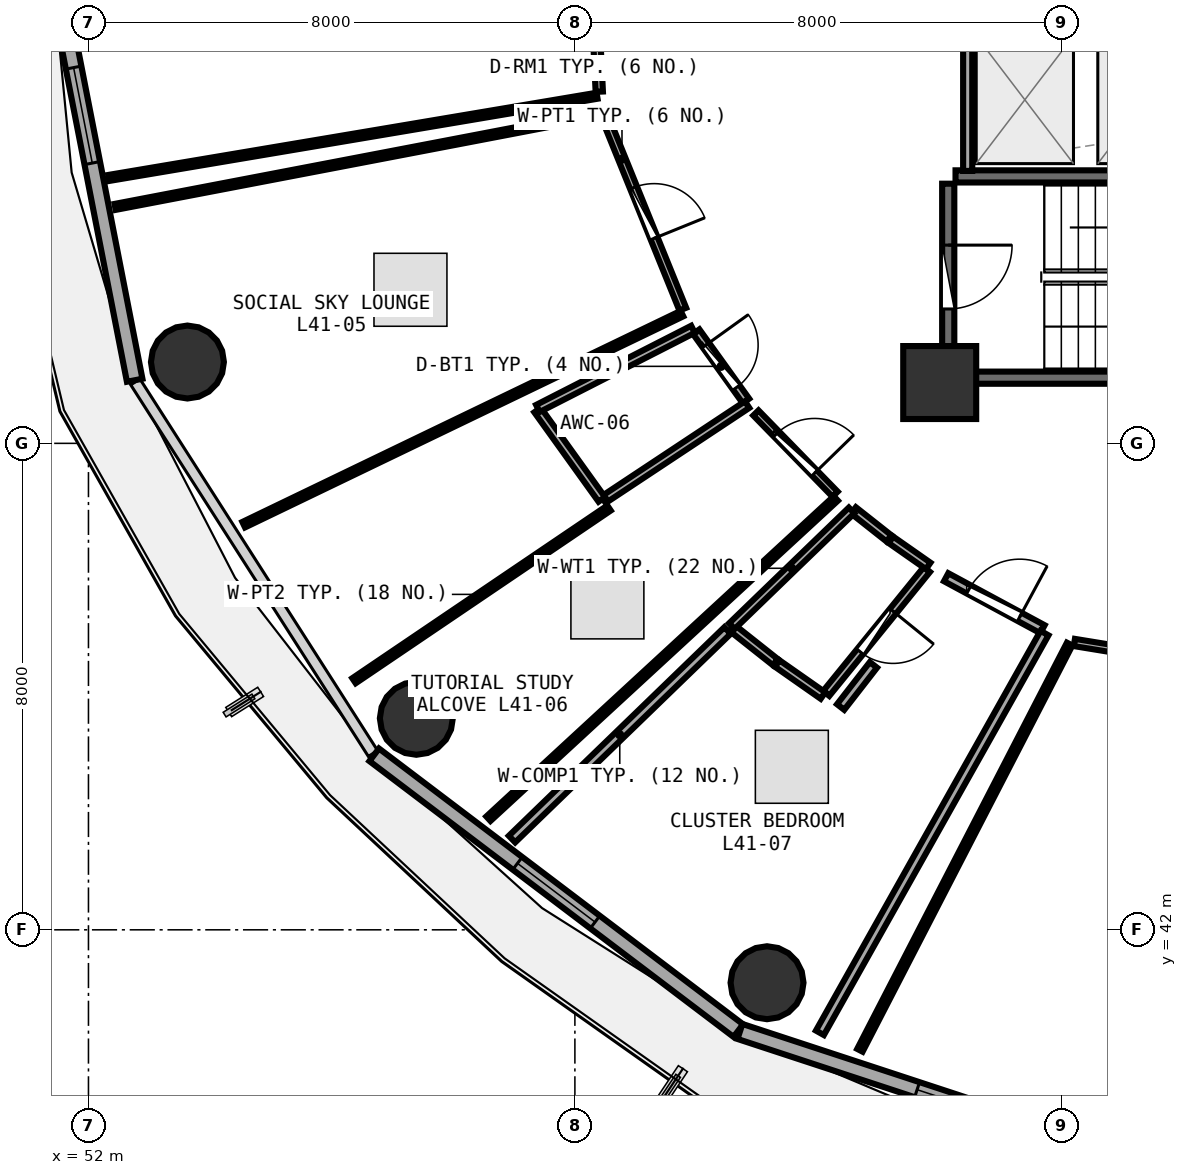
"""IFC4 building model, lengths in metres.
Left out: names, types, materials, properties, quantities, classifications, styles, units other than length and angle.
Written with IfcOpenShell. Run it as: python <this file> out.ifc"""

import sys

from ifc_helpers import new_model, si_unit, direction, frame, frame_2d, origin, origin_2d, place, context, subcontext, project, spatial, rectangle, circle, extrude, element, fill, save


model = new_model("IFC4")
c1 = context("Model", 3, precision=1e-05, world=origin(), true_north=direction((0.0, 1.0)))
c2 = subcontext(c1, "Body", "Model", "MODEL_VIEW")
j1 = project(units=[si_unit("LENGTHUNIT", "METRE"), si_unit("PLANEANGLEUNIT", "RADIAN")], contexts=[c1])
p1 = place(None, origin())
s1 = spatial("IfcSite", under=j1, at=p1, CompositionType="ELEMENT")
p2 = place(p1, origin())
s2 = spatial("IfcBuilding", under=s1, at=p2, CompositionType="ELEMENT")
p3 = place(p2, frame((0.0, 0.0, 161.85)))
s3 = spatial("IfcBuildingStorey", under=s2, at=p3, CompositionType="ELEMENT", Elevation=161.85)
p4 = place(p3, frame((66.0, 51.0, 0.0), z_axis=(0.0, 0.0, 1.0), x_axis=(1.0, 0.0, 0.0)))
e1 = element("IfcColumn", 1, at=p4, inside=s3, PredefinedType="PILASTER", context=c2, shape_type="SweptSolid", body=[
    extrude(rectangle(XDim=1.2, YDim=1.2, at=origin_2d()), origin(), (0.0, 0.0, 1.0), 3.75),
])
for number, where, z_axis, x_axis in (
    (2, (53.627, 51.337, 0.0), (0.0, 0.0, 1.0), (1.0, 0.0, 0.0)),
    (3, (57.392, 45.479, 0.0), (0.0, 0.0, 1.0), (1.0, 0.0, 0.0)),
    (4, (63.16, 41.13, 0.0), (0.0, 0.0, 1.0), (1.0, 0.0, 0.0)),
):
    element("IfcColumn", number, at=place(p3, frame(where, z_axis=z_axis, x_axis=x_axis)), inside=s3, PredefinedType="COLUMN", context=c2, shape_type="SweptSolid", body=[
        extrude(circle(Radius=0.6, at=origin_2d()), origin(), (0.0, 0.0, 1.0), 3.75),
    ])
p5 = place(p3, frame((51.403, 57.985, 0.0), z_axis=(0.0, 0.0, 1.0), x_axis=(0.191716984769, -0.981450252306, 0.0)))
e5 = element("IfcWall", 5, at=p5, inside=s3, PredefinedType="SOLIDWALL", context=c2, shape_type="SweptSolid", body=[
    extrude(rectangle(XDim=7.079, YDim=0.26, at=frame_2d((3.54, 0.0))), origin(), (0.0, 0.0, 1.0), 3.475),
])
p6 = place(p5, frame((1.84, 0.0, 0.85)))
e6 = element("IfcOpeningElement", 6, at=p6, cuts=e5, PredefinedType="OPENING", context=c2, shape_type="SweptSolid", body=[
    extrude(rectangle(XDim=1.6, YDim=1.45, at=frame_2d((0.8, 0.725))), frame((0.0, 0.14, 0.0), z_axis=(0.0, -1.0, 0.0), x_axis=(1.0, 0.0, 0.0)), (0.0, 0.0, 1.0), 0.28),
])
p7 = place(p3, frame((56.699, 44.878, 0.0), z_axis=(0.0, 0.0, 1.0), x_axis=(0.797163719609, -0.603763202042, 0.0)))
e7 = element("IfcWall", 7, at=p7, inside=s3, PredefinedType="SOLIDWALL", context=c2, shape_type="SweptSolid", body=[
    extrude(rectangle(XDim=7.512, YDim=0.26, at=frame_2d((3.756, 0.0))), origin(), (0.0, 0.0, 1.0), 3.475),
])
p8 = place(p7, frame((2.956, 0.0, 0.85)))
e8 = element("IfcOpeningElement", 8, at=p8, cuts=e7, PredefinedType="OPENING", context=c2, shape_type="SweptSolid", body=[
    extrude(rectangle(XDim=1.6, YDim=1.45, at=frame_2d((0.8, 0.725))), frame((0.0, 0.14, 0.0), z_axis=(0.0, -1.0, 0.0), x_axis=(1.0, 0.0, 0.0)), (0.0, 0.0, 1.0), 0.28),
])
p9 = place(p3, frame((62.714, 40.328, 0.0), z_axis=(0.0, 0.0, 1.0), x_axis=(0.950038302428, -0.312133343173, 0.0)))
e9 = element("IfcWall", 9, at=p9, inside=s3, PredefinedType="SOLIDWALL", context=c2, shape_type="SweptSolid", body=[
    extrude(rectangle(XDim=7.733, YDim=0.26, at=frame_2d((3.867, 0.0))), origin(), (0.0, 0.0, 1.0), 3.475),
])
p10 = place(p9, frame((3.067, 0.0, 0.85)))
e10 = element("IfcOpeningElement", 10, at=p10, cuts=e9, PredefinedType="OPENING", context=c2, shape_type="SweptSolid", body=[
    extrude(rectangle(XDim=1.6, YDim=1.45, at=frame_2d((0.8, 0.725))), frame((0.0, 0.14, 0.0), z_axis=(0.0, -1.0, 0.0), x_axis=(1.0, 0.0, 0.0)), (0.0, 0.0, 1.0), 0.28),
])
for number, where, z_axis, x_axis in (
    (11, (66.26, 51.08, 0.0), (0.0, 0.0, 1.0), (1.0, 0.0, 0.0)),
    (12, (73.42, 54.39, 0.0), (0.0, 0.0, 1.0), (-1.0, 0.0, 0.0)),
):
    element("IfcWall", number, at=place(p3, frame(where, z_axis=z_axis, x_axis=x_axis)), inside=s3, PredefinedType="SHEAR", context=c2, shape_type="SweptSolid", body=[
        extrude(rectangle(XDim=7.16, YDim=0.2, at=frame_2d((3.58, 0.0))), origin(), (0.0, 0.0, 1.0), 3.49),
    ])
p11 = place(p3, frame((66.14, 54.27, 0.0), z_axis=(0.0, 0.0, 1.0), x_axis=(0.0, -1.0, 0.0)))
e13 = element("IfcWall", 13, at=p11, inside=s3, PredefinedType="SHEAR", context=c2, shape_type="SweptSolid", body=[
    extrude(rectangle(XDim=3.07, YDim=0.2, at=frame_2d((1.535, 0.0))), origin(), (0.0, 0.0, 1.0), 3.49),
])
p12 = place(p11, frame((1.01, 0.0, 0.0)))
e14 = element("IfcOpeningElement", 14, at=p12, cuts=e13, PredefinedType="OPENING", context=c2, shape_type="SweptSolid", body=[
    extrude(rectangle(XDim=1.05, YDim=2.1, at=frame_2d((0.525, 1.05))), frame((0.0, 0.11, 0.0), z_axis=(0.0, -1.0, 0.0), x_axis=(1.0, 0.0, 0.0)), (0.0, 0.0, 1.0), 0.22),
])
p13 = place(p3, frame((66.46, 54.48, 0.0), z_axis=(0.0, 0.0, 1.0), x_axis=(0.0, 1.0, 0.0)))
e15 = element("IfcWall", 15, at=p13, inside=s3, PredefinedType="PARTITIONING", context=c2, shape_type="SweptSolid", body=[
    extrude(rectangle(XDim=2.29, YDim=0.15, at=frame_2d((1.145, 0.0))), origin(), (0.0, 0.0, 1.0), 3.48),
])
p14 = place(p3, frame((68.214, 46.725, 0.0), z_axis=(0.0, 0.0, 1.0), x_axis=(0.986922164317, -0.161197523493, 0.0)))
e16 = element("IfcWall", 16, at=p14, inside=s3, PredefinedType="PARTITIONING", context=c2, shape_type="SweptSolid", body=[
    extrude(rectangle(XDim=6.877, YDim=0.12, at=frame_2d((3.439, 0.0))), origin(), (0.0, 0.0, 1.0), 2.975),
])
p15 = place(p14, frame((2.989, 0.0, 0.0)))
e17 = element("IfcOpeningElement", 17, at=p15, cuts=e16, PredefinedType="OPENING", context=c2, shape_type="SweptSolid", body=[
    extrude(rectangle(XDim=0.9, YDim=2.08, at=frame_2d((0.45, 1.04))), frame((0.0, 0.07, 0.0), z_axis=(0.0, -1.0, 0.0), x_axis=(1.0, 0.0, 0.0)), (0.0, 0.0, 1.0), 0.14),
])
p16 = place(p3, frame((60.238, 59.144, 0.0), z_axis=(0.0, 0.0, 1.0), x_axis=(0.048537190422, -0.998821375996, 0.0)))
e18 = element("IfcWall", 18, at=p16, inside=s3, PredefinedType="PARTITIONING", context=c2, shape_type="SweptSolid", body=[
    extrude(rectangle(XDim=3.365, YDim=0.12, at=frame_2d((1.683, 0.0))), origin(), (0.0, 0.0, 1.0), 2.975),
])
p17 = place(p16, frame((1.233, 0.0, 0.0)))
e19 = element("IfcOpeningElement", 19, at=p17, cuts=e18, PredefinedType="OPENING", context=c2, shape_type="SweptSolid", body=[
    extrude(rectangle(XDim=0.9, YDim=2.08, at=frame_2d((0.45, 1.04))), frame((0.0, 0.07, 0.0), z_axis=(0.0, -1.0, 0.0), x_axis=(1.0, 0.0, 0.0)), (0.0, 0.0, 1.0), 0.14),
])
p18 = place(p3, frame((60.492, 55.369, 0.0), z_axis=(0.0, 0.0, 1.0), x_axis=(0.3756420079, -0.926764847143, 0.0)))
e20 = element("IfcWall", 20, at=p18, inside=s3, PredefinedType="PARTITIONING", context=c2, shape_type="SweptSolid", body=[
    extrude(rectangle(XDim=3.413, YDim=0.12, at=frame_2d((1.707, 0.0))), origin(), (0.0, 0.0, 1.0), 3.235),
])
p19 = place(p18, frame((1.256, 0.0, 0.0)))
e21 = element("IfcOpeningElement", 21, at=p19, cuts=e20, PredefinedType="OPENING", context=c2, shape_type="SweptSolid", body=[
    extrude(rectangle(XDim=0.9, YDim=2.08, at=frame_2d((0.45, 1.04))), frame((0.0, 0.07, 0.0), z_axis=(0.0, -1.0, 0.0), x_axis=(1.0, 0.0, 0.0)), (0.0, 0.0, 1.0), 0.14),
])
p20 = place(p3, frame((61.995, 51.836, 0.0), z_axis=(0.0, 0.0, 1.0), x_axis=(0.583589438572, -0.81204886995, 0.0)))
e22 = element("IfcWall", 22, at=p20, inside=s3, PredefinedType="PLUMBINGWALL", context=c2, shape_type="SweptSolid", body=[
    extrude(rectangle(XDim=1.403, YDim=0.13, at=frame_2d((0.702, 0.0))), origin(), (0.0, 0.0, 1.0), 2.975),
])
p21 = place(p20, frame((0.272, 0.0, 0.0)))
e23 = element("IfcOpeningElement", 23, at=p21, cuts=e22, PredefinedType="OPENING", context=c2, shape_type="SweptSolid", body=[
    extrude(rectangle(XDim=0.86, YDim=2.05, at=frame_2d((0.43, 1.025))), frame((0.0, 0.075, 0.0), z_axis=(0.0, -1.0, 0.0), x_axis=(1.0, 0.0, 0.0)), (0.0, 0.0, 1.0), 0.15),
])
p22 = place(p3, frame((62.977, 50.5, 0.0), z_axis=(0.0, 0.0, 1.0), x_axis=(0.69801962686, -0.71607862733, 0.0)))
e24 = element("IfcWall", 24, at=p22, inside=s3, PredefinedType="PARTITIONING", context=c2, shape_type="SweptSolid", body=[
    extrude(rectangle(XDim=1.866, YDim=0.12, at=frame_2d((0.933, 0.0))), origin(), (0.0, 0.0, 1.0), 2.975),
])
p23 = place(p22, frame((0.483, 0.0, 0.0)))
e25 = element("IfcOpeningElement", 25, at=p23, cuts=e24, PredefinedType="OPENING", context=c2, shape_type="SweptSolid", body=[
    extrude(rectangle(XDim=0.9, YDim=2.08, at=frame_2d((0.45, 1.04))), frame((0.0, 0.07, 0.0), z_axis=(0.0, -1.0, 0.0), x_axis=(1.0, 0.0, 0.0)), (0.0, 0.0, 1.0), 0.14),
])
p24 = place(p3, frame((65.789, 47.927, 0.0), z_axis=(0.0, 0.0, 1.0), x_axis=(-0.630358119741, -0.776304476914, 0.0)))
e26 = element("IfcWall", 26, at=p24, inside=s3, PredefinedType="PLUMBINGWALL", context=c2, shape_type="SweptSolid", body=[
    extrude(rectangle(XDim=2.626, YDim=0.13, at=frame_2d((1.313, 0.0))), origin(), (0.0, 0.0, 1.0), 2.975),
])
p25 = place(p24, frame((0.883, 0.0, 0.0)))
e27 = element("IfcOpeningElement", 27, at=p25, cuts=e26, PredefinedType="OPENING", context=c2, shape_type="SweptSolid", body=[
    extrude(rectangle(XDim=0.86, YDim=2.05, at=frame_2d((0.43, 1.025))), frame((0.0, 0.075, 0.0), z_axis=(0.0, -1.0, 0.0), x_axis=(1.0, 0.0, 0.0)), (0.0, 0.0, 1.0), 0.15),
])
p26 = place(p3, frame((66.106, 47.799, 0.0), z_axis=(0.0, 0.0, 1.0), x_axis=(0.880052757217, -0.474875925389, 0.0)))
e28 = element("IfcWall", 28, at=p26, inside=s3, PredefinedType="PARTITIONING", context=c2, shape_type="SweptSolid", body=[
    extrude(rectangle(XDim=1.801, YDim=0.15, at=frame_2d((0.9, 0.0))), origin(), (0.0, 0.0, 1.0), 3.235),
])
p27 = place(p26, frame((0.425, 0.0, 0.0)))
e29 = element("IfcOpeningElement", 29, at=p27, cuts=e28, PredefinedType="OPENING", context=c2, shape_type="SweptSolid", body=[
    extrude(rectangle(XDim=0.95, YDim=2.08, at=frame_2d((0.475, 1.04))), frame((0.0, 0.085, 0.0), z_axis=(0.0, -1.0, 0.0), x_axis=(1.0, 0.0, 0.0)), (0.0, 0.0, 1.0), 0.17),
])
p28 = place(p3, frame((64.688, 40.019, 0.0), z_axis=(0.0, 0.0, 1.0), x_axis=(0.458748787104, 0.888566007864, 0.0)))
e30 = element("IfcWall", 30, at=p28, inside=s3, PredefinedType="PARTITIONING", context=c2, shape_type="SweptSolid", body=[
    extrude(rectangle(XDim=7.519, YDim=0.1, at=frame_2d((3.759, 0.0))), origin(), (0.0, 0.0, 1.0), 3.025),
])
p29 = place(p3, frame((60.365, 55.716, 0.0), z_axis=(0.0, 0.0, 1.0), x_axis=(-0.986127701838, -0.165988420279, 0.0)))
e31 = element("IfcWall", 31, at=p29, inside=s3, PredefinedType="PARTITIONING", context=c2, shape_type="SweptSolid", body=[
    extrude(rectangle(XDim=8.144, YDim=0.1, at=frame_2d((4.072, 0.0))), origin(), (0.0, 0.0, 1.0), 3.025),
])
p30 = place(p3, frame((61.761, 52.134, 0.0), z_axis=(0.0, 0.0, 1.0), x_axis=(-0.900968975812, -0.433883515042, 0.0)))
e32 = element("IfcWall", 32, at=p30, inside=s3, PredefinedType="PARTITIONING", context=c2, shape_type="SweptSolid", body=[
    extrude(rectangle(XDim=8.0, YDim=0.1, at=frame_2d((4.0, 0.0))), origin(), (0.0, 0.0, 1.0), 2.975),
])
p31 = place(p3, frame((52.438, 53.888, 0.0), z_axis=(0.0, 0.0, 1.0), x_axis=(0.982187250003, 0.187904778897, 0.0)))
e33 = element("IfcWall", 33, at=p31, inside=s3, PredefinedType="PARTITIONING", context=c2, shape_type="SweptSolid", body=[
    extrude(rectangle(XDim=8.137, YDim=0.1, at=frame_2d((4.069, 0.0))), origin(), (0.0, 0.0, 1.0), 3.025),
])
p32 = place(p3, frame((62.832, 50.637, 0.0), z_axis=(0.0, 0.0, 1.0), x_axis=(-0.833743735775, -0.55215159427, 0.0)))
e34 = element("IfcWall", 34, at=p32, inside=s3, PredefinedType="PLUMBINGWALL", context=c2, shape_type="SweptSolid", body=[
    extrude(rectangle(XDim=2.833, YDim=0.13, at=frame_2d((1.416, 0.0))), origin(), (0.0, 0.0, 1.0), 3.235),
])
p33 = place(p3, frame((60.442, 49.078, 0.0), z_axis=(0.0, 0.0, 1.0), x_axis=(-0.583480474688, 0.812127167172, 0.0)))
e35 = element("IfcWall", 35, at=p33, inside=s3, PredefinedType="PLUMBINGWALL", context=c2, shape_type="SweptSolid", body=[
    extrude(rectangle(XDim=1.811, YDim=0.13, at=frame_2d((0.906, 0.0))), origin(), (0.0, 0.0, 1.0), 3.48),
])
p34 = place(p3, frame((59.392, 50.574, 0.0), z_axis=(0.0, 0.0, 1.0), x_axis=(0.890678731245, 0.45463325627, 0.0)))
e36 = element("IfcWall", 36, at=p34, inside=s3, PredefinedType="PLUMBINGWALL", context=c2, shape_type="SweptSolid", body=[
    extrude(rectangle(XDim=2.863, YDim=0.13, at=frame_2d((1.432, 0.0))), origin(), (0.0, 0.0, 1.0), 2.975),
])
p35 = place(p3, frame((64.292, 49.094, 0.0), z_axis=(0.0, 0.0, 1.0), x_axis=(-0.73529828134, -0.677743636973, 0.0)))
e37 = element("IfcWall", 37, at=p35, inside=s3, PredefinedType="PARTITIONING", context=c2, shape_type="SweptSolid", body=[
    extrude(rectangle(XDim=7.771, YDim=0.1, at=frame_2d((3.886, 0.0))), origin(), (0.0, 0.0, 1.0), 3.025),
])
p36 = place(p3, frame((56.367, 46.096, 0.0), z_axis=(0.0, 0.0, 1.0), x_axis=(0.828061619218, 0.560637097219, 0.0)))
e38 = element("IfcWall", 38, at=p36, inside=s3, PredefinedType="PARTITIONING", context=c2, shape_type="SweptSolid", body=[
    extrude(rectangle(XDim=5.065, YDim=0.1, at=frame_2d((2.532, 0.0))), origin(), (0.0, 0.0, 1.0), 3.025),
])
p37 = place(p3, frame((64.581, 48.899, 0.0), z_axis=(0.0, 0.0, 1.0), x_axis=(0.785042223167, -0.619442255456, 0.0)))
e39 = element("IfcWall", 39, at=p37, inside=s3, PredefinedType="PLUMBINGWALL", context=c2, shape_type="SweptSolid", body=[
    extrude(rectangle(XDim=0.745, YDim=0.13, at=frame_2d((0.372, 0.0))), origin(), (0.0, 0.0, 1.0), 2.975),
])
p38 = place(p3, frame((65.198, 48.414, 0.0), z_axis=(0.0, 0.0, 1.0), x_axis=(0.819339212877, -0.573309039038, 0.0)))
e40 = element("IfcWall", 40, at=p38, inside=s3, PredefinedType="PLUMBINGWALL", context=c2, shape_type="SweptSolid", body=[
    extrude(rectangle(XDim=0.748, YDim=0.13, at=frame_2d((0.374, 0.0))), origin(), (0.0, 0.0, 1.0), 2.975),
])
p39 = place(p3, frame((64.08, 45.853, 0.0), z_axis=(0.0, 0.0, 1.0), x_axis=(-0.819219412421, 0.57348021266, 0.0)))
e41 = element("IfcWall", 41, at=p39, inside=s3, PredefinedType="PLUMBINGWALL", context=c2, shape_type="SweptSolid", body=[
    extrude(rectangle(XDim=0.917, YDim=0.13, at=frame_2d((0.458, 0.0))), origin(), (0.0, 0.0, 1.0), 3.48),
])
p40 = place(p3, frame((63.296, 46.402, 0.0), z_axis=(0.0, 0.0, 1.0), x_axis=(-0.783920729318, 0.620860926573, 0.0)))
e42 = element("IfcWall", 42, at=p40, inside=s3, PredefinedType="PLUMBINGWALL", context=c2, shape_type="SweptSolid", body=[
    extrude(rectangle(XDim=0.91, YDim=0.13, at=frame_2d((0.455, 0.0))), origin(), (0.0, 0.0, 1.0), 3.48),
])
p41 = place(p3, frame((62.581, 46.994, 0.0), z_axis=(0.0, 0.0, 1.0), x_axis=(0.719038860306, 0.694969867958, 0.0)))
e43 = element("IfcWall", 43, at=p41, inside=s3, PredefinedType="PLUMBINGWALL", context=c2, shape_type="SweptSolid", body=[
    extrude(rectangle(XDim=2.739, YDim=0.13, at=frame_2d((1.369, 0.0))), origin(), (0.0, 0.0, 1.0), 3.235),
])
p42 = place(p3, frame((67.723, 46.88, 0.0), z_axis=(0.0, 0.0, 1.0), x_axis=(-0.489843086235, -0.8718106164, 0.0)))
e44 = element("IfcWall", 44, at=p42, inside=s3, PredefinedType="PARTITIONING", context=c2, shape_type="SweptSolid", body=[
    extrude(rectangle(XDim=7.541, YDim=0.15, at=frame_2d((3.771, 0.0))), origin(), (0.0, 0.0, 1.0), 3.025),
])
p43 = place(p3, frame((58.966, 43.492, 0.0), z_axis=(0.0, 0.0, 1.0), x_axis=(0.718569427948, 0.695455230204, 0.0)))
e45 = element("IfcWall", 45, at=p43, inside=s3, PredefinedType="PARTITIONING", context=c2, shape_type="SweptSolid", body=[
    extrude(rectangle(XDim=4.933, YDim=0.15, at=frame_2d((2.466, 0.0))), origin(), (0.0, 0.0, 1.0), 3.025),
])
p44 = place(p3, frame((64.371, 45.664, 0.0), z_axis=(0.0, 0.0, 1.0), x_axis=(0.613921364126, 0.789367188747, 0.0)))
e46 = element("IfcWall", 46, at=p44, inside=s3, PredefinedType="PARTITIONING", context=c2, shape_type="SweptSolid", body=[
    extrude(rectangle(XDim=0.878, YDim=0.15, at=frame_2d((0.439, 0.0))), origin(), (0.0, 0.0, 1.0), 2.975),
])
p45 = place(p6, origin())
e47 = element("IfcWindow", 47, at=p45, inside=s3, PartitioningType="SINGLE_PANEL", PredefinedType="WINDOW", context=c2, shape_type="SweptSolid", body=[
    extrude(rectangle(XDim=1.6, YDim=1.45, at=frame_2d((0.8, 0.725))), frame((0.0, 0.03, 0.0), z_axis=(0.0, -1.0, 0.0), x_axis=(1.0, 0.0, 0.0)), (0.0, 0.0, 1.0), 0.06),
])
fill(e6, e47)
p46 = place(p8, origin())
e48 = element("IfcWindow", 48, at=p46, inside=s3, PartitioningType="SINGLE_PANEL", PredefinedType="WINDOW", context=c2, shape_type="SweptSolid", body=[
    extrude(rectangle(XDim=1.6, YDim=1.45, at=frame_2d((0.8, 0.725))), frame((0.0, 0.03, 0.0), z_axis=(0.0, -1.0, 0.0), x_axis=(1.0, 0.0, 0.0)), (0.0, 0.0, 1.0), 0.06),
])
fill(e8, e48)
p47 = place(p10, origin())
e49 = element("IfcWindow", 49, at=p47, inside=s3, PartitioningType="SINGLE_PANEL", PredefinedType="WINDOW", context=c2, shape_type="SweptSolid", body=[
    extrude(rectangle(XDim=1.6, YDim=1.45, at=frame_2d((0.8, 0.725))), frame((0.0, 0.03, 0.0), z_axis=(0.0, -1.0, 0.0), x_axis=(1.0, 0.0, 0.0)), (0.0, 0.0, 1.0), 0.06),
])
fill(e10, e49)
p48 = place(p12, origin())
e50 = element("IfcDoor", 50, at=p48, inside=s3, OperationType="SINGLE_SWING_LEFT", PredefinedType="DOOR", context=c2, shape_type="SweptSolid", body=[
    extrude(rectangle(XDim=1.05, YDim=2.1, at=frame_2d((0.525, 1.05))), frame((0.0, 0.025, 0.0), z_axis=(0.0, -1.0, 0.0), x_axis=(1.0, 0.0, 0.0)), (0.0, 0.0, 1.0), 0.05),
])
fill(e14, e50)
p49 = place(p19, origin())
e51 = element("IfcDoor", 51, at=p49, inside=s3, OperationType="SINGLE_SWING_RIGHT", PredefinedType="DOOR", context=c2, shape_type="SweptSolid", body=[
    extrude(rectangle(XDim=0.9, YDim=2.08, at=frame_2d((0.45, 1.04))), frame((0.0, 0.025, 0.0), z_axis=(0.0, -1.0, 0.0), x_axis=(1.0, 0.0, 0.0)), (0.0, 0.0, 1.0), 0.05),
])
fill(e21, e51)
p50 = place(p21, origin())
e52 = element("IfcDoor", 52, at=p50, inside=s3, OperationType="SINGLE_SWING_LEFT", PredefinedType="DOOR", context=c2, shape_type="SweptSolid", body=[
    extrude(rectangle(XDim=0.86, YDim=2.05, at=frame_2d((0.43, 1.025))), frame((0.0, 0.025, 0.0), z_axis=(0.0, -1.0, 0.0), x_axis=(1.0, 0.0, 0.0)), (0.0, 0.0, 1.0), 0.05),
])
fill(e23, e52)
p51 = place(p23, origin())
e53 = element("IfcDoor", 53, at=p51, inside=s3, OperationType="SINGLE_SWING_RIGHT", PredefinedType="DOOR", context=c2, shape_type="SweptSolid", body=[
    extrude(rectangle(XDim=0.9, YDim=2.08, at=frame_2d((0.45, 1.04))), frame((0.0, 0.025, 0.0), z_axis=(0.0, -1.0, 0.0), x_axis=(1.0, 0.0, 0.0)), (0.0, 0.0, 1.0), 0.05),
])
fill(e25, e53)
p52 = place(p25, origin())
e54 = element("IfcDoor", 54, at=p52, inside=s3, OperationType="SINGLE_SWING_LEFT", PredefinedType="DOOR", context=c2, shape_type="SweptSolid", body=[
    extrude(rectangle(XDim=0.86, YDim=2.05, at=frame_2d((0.43, 1.025))), frame((0.0, 0.025, 0.0), z_axis=(0.0, -1.0, 0.0), x_axis=(1.0, 0.0, 0.0)), (0.0, 0.0, 1.0), 0.05),
])
fill(e27, e54)
p53 = place(p27, origin())
e55 = element("IfcDoor", 55, at=p53, inside=s3, OperationType="SINGLE_SWING_RIGHT", PredefinedType="DOOR", context=c2, shape_type="SweptSolid", body=[
    extrude(rectangle(XDim=0.95, YDim=2.08, at=frame_2d((0.475, 1.04))), frame((0.0, 0.025, 0.0), z_axis=(0.0, -1.0, 0.0), x_axis=(1.0, 0.0, 0.0)), (0.0, 0.0, 1.0), 0.05),
])
fill(e29, e55)
save(model, sys.argv[1])
